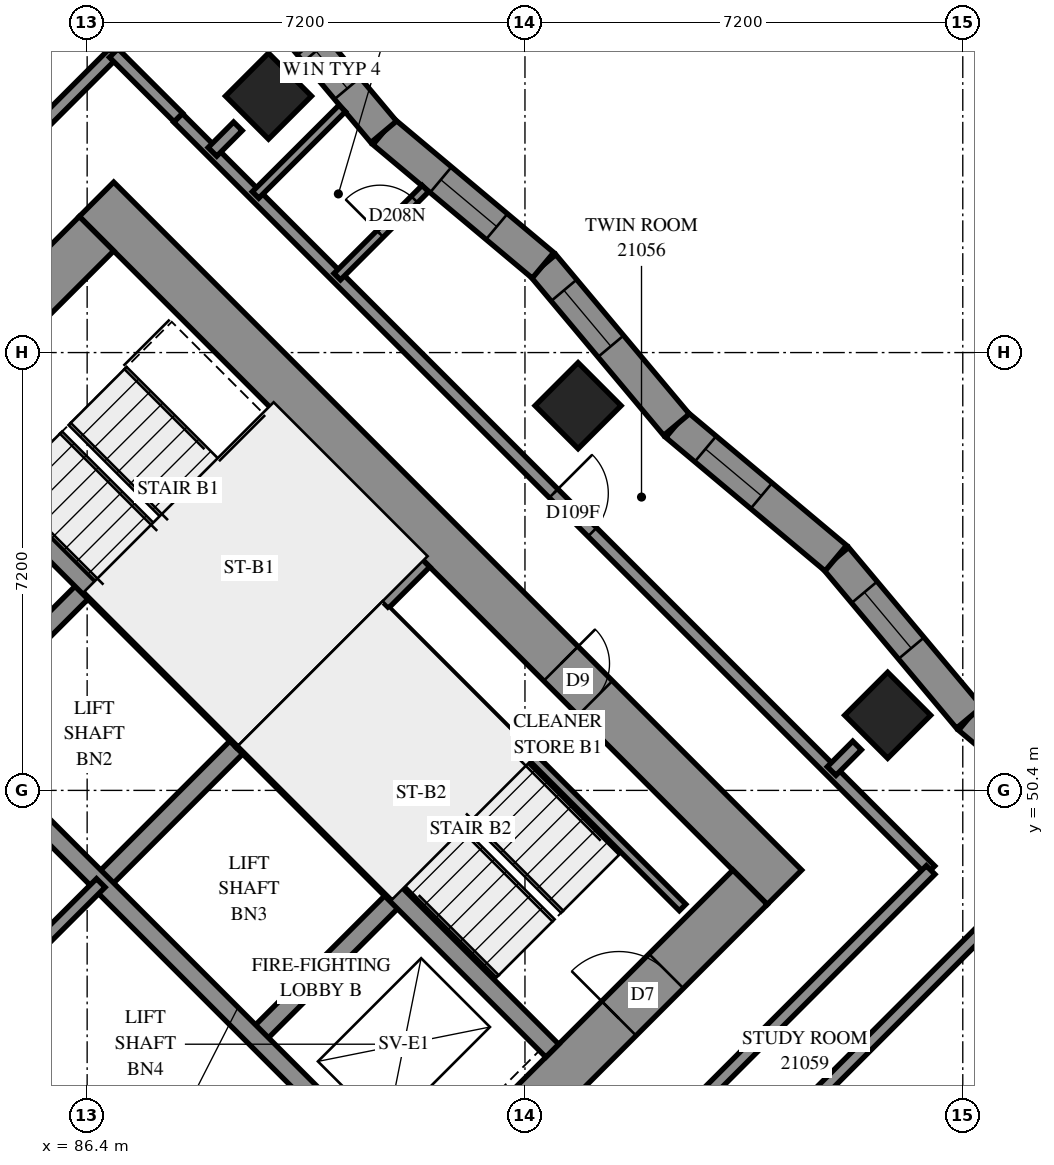
"""IFC4 building model, lengths in metres.
Left out: names, types, materials, properties, quantities, classifications, styles, units other than length and angle.
Written with IfcOpenShell. Run it as: python <this file> out.ifc"""

import sys

from ifc_helpers import new_model, si_unit, direction, frame, frame_2d, origin, origin_2d, place, context, subcontext, project, spatial, polyline, rectangle, outline, extrude, element, fill, save


model = new_model("IFC4")
c1 = context("Model", 3, precision=1e-05, world=origin(), true_north=direction((0.0, 1.0)))
c2 = subcontext(c1, "Body", "Model", "MODEL_VIEW")
j1 = project(units=[si_unit("LENGTHUNIT", "METRE"), si_unit("PLANEANGLEUNIT", "RADIAN")], contexts=[c1])
p1 = place(None, origin())
s1 = spatial("IfcSite", under=j1, at=p1, CompositionType="ELEMENT")
p2 = place(p1, origin())
s2 = spatial("IfcBuilding", under=s1, at=p2, CompositionType="ELEMENT")
p3 = place(p2, frame((0.0, 0.0, 81.2)))
s3 = spatial("IfcBuildingStorey", under=s2, at=p3, CompositionType="ELEMENT", Elevation=81.2)
for number, where, z_axis, x_axis in (
    (1, (89.382, 61.818, 0.0), (0.0, 0.0, 1.0), (0.707, -0.707, 0.0)),
    (2, (94.474, 56.727, 0.0), (0.0, 0.0, 1.0), (0.707, -0.707, 0.0)),
    (3, (99.565, 51.635, 0.0), (0.0, 0.0, 1.0), (0.707, -0.707, 0.0)),
):
    element("IfcColumn", number, at=place(p3, frame(where, z_axis=z_axis, x_axis=x_axis)), inside=s3, PredefinedType="COLUMN", context=c2, shape_type="SweptSolid", body=[
        extrude(rectangle(XDim=1.0, YDim=1.0, at=origin_2d()), origin(), (0.0, 0.0, 1.0), 3.1),
    ])
p4 = place(p3, frame((75.806, 49.373, -0.3), z_axis=(0.0, 0.0, 1.0), x_axis=(0.7071067812, -0.7071067812, 0.0)))
e4 = element("IfcWall", 4, at=p4, inside=s3, PredefinedType="SHEAR", context=c2, shape_type="SweptSolid", body=[
    extrude(rectangle(XDim=16.0, YDim=0.8, at=frame_2d((8.0, 0.0))), origin(), (0.0, 0.0, 1.0), 2.7),
])
p5 = place(p3, frame((86.554, 60.121, -0.3), z_axis=(0.0, 0.0, 1.0), x_axis=(0.7071067812, -0.7071067812, 0.0)))
e5 = element("IfcWall", 5, at=p5, inside=s3, PredefinedType="SHEAR", context=c2, shape_type="SweptSolid", body=[
    extrude(rectangle(XDim=16.0, YDim=0.8, at=frame_2d((8.0, 0.0))), origin(), (0.0, 0.0, 1.0), 2.7),
])
p6 = place(p5, frame((10.8, 0.0, 0.3)))
e6 = element("IfcOpeningElement", 6, at=p6, cuts=e5, PredefinedType="OPENING", context=c2, shape_type="SweptSolid", body=[
    extrude(rectangle(XDim=0.8, YDim=2.1, at=frame_2d((0.4, 1.05))), frame((0.0, 0.41, 0.0), z_axis=(0.0, -1.0, 0.0), x_axis=(1.0, 0.0, 0.0)), (0.0, 0.0, 1.0), 0.82),
])
p7 = place(p3, frame((76.372, 49.373, -0.3), z_axis=(0.0, 0.0, 1.0), x_axis=(0.7071067812, 0.7071067812, 0.0)))
e7 = element("IfcWall", 7, at=p7, inside=s3, PredefinedType="SHEAR", context=c2, shape_type="SweptSolid", body=[
    extrude(rectangle(XDim=14.4, YDim=0.8, at=frame_2d((7.2, 0.0))), origin(), (0.0, 0.0, 1.0), 2.7),
])
p8 = place(p7, frame((4.55, 0.0, 0.3)))
e8 = element("IfcOpeningElement", 8, at=p8, cuts=e7, PredefinedType="OPENING", context=c2, shape_type="SweptSolid", body=[
    extrude(rectangle(XDim=1.1, YDim=2.1, at=frame_2d((0.55, 1.05))), frame((0.0, 0.41, 0.0), z_axis=(0.0, -1.0, 0.0), x_axis=(1.0, 0.0, 0.0)), (0.0, 0.0, 1.0), 0.82),
])
p9 = place(p7, frame((11.35, 0.0, 0.3)))
e9 = element("IfcOpeningElement", 9, at=p9, cuts=e7, PredefinedType="OPENING", context=c2, shape_type="SweptSolid", body=[
    extrude(rectangle(XDim=1.1, YDim=2.1, at=frame_2d((0.55, 1.05))), frame((0.0, 0.41, 0.0), z_axis=(0.0, -1.0, 0.0), x_axis=(1.0, 0.0, 0.0)), (0.0, 0.0, 1.0), 0.82),
])
p10 = place(p3, frame((87.12, 38.625, -0.3), z_axis=(0.0, 0.0, 1.0), x_axis=(0.7071067812, 0.7071067812, 0.0)))
e10 = element("IfcWall", 10, at=p10, inside=s3, PredefinedType="SHEAR", context=c2, shape_type="SweptSolid", body=[
    extrude(rectangle(XDim=14.4, YDim=0.8, at=frame_2d((7.2, 0.0))), origin(), (0.0, 0.0, 1.0), 2.7),
])
p11 = place(p10, frame((4.55, 0.0, 0.3)))
e11 = element("IfcOpeningElement", 11, at=p11, cuts=e10, PredefinedType="OPENING", context=c2, shape_type="SweptSolid", body=[
    extrude(rectangle(XDim=1.1, YDim=2.1, at=frame_2d((0.55, 1.05))), frame((0.0, 0.41, 0.0), z_axis=(0.0, -1.0, 0.0), x_axis=(1.0, 0.0, 0.0)), (0.0, 0.0, 1.0), 0.82),
])
p12 = place(p10, frame((11.35, 0.0, 0.3)))
e12 = element("IfcOpeningElement", 12, at=p12, cuts=e10, PredefinedType="OPENING", context=c2, shape_type="SweptSolid", body=[
    extrude(rectangle(XDim=1.1, YDim=2.1, at=frame_2d((0.55, 1.05))), frame((0.0, 0.41, 0.0), z_axis=(0.0, -1.0, 0.0), x_axis=(1.0, 0.0, 0.0)), (0.0, 0.0, 1.0), 0.82),
])
p13 = place(p3, frame((84.079, 51.423, 0.0), z_axis=(0.0, 0.0, 1.0), x_axis=(0.7071219326, 0.7070916295, 0.0)))
e13 = element("IfcWall", 13, at=p13, inside=s3, PredefinedType="SOLIDWALL", context=c2, shape_type="SweptSolid", body=[
    extrude(rectangle(XDim=3.3, YDim=0.3, at=frame_2d((1.65, 0.0))), origin(), (0.0, 0.0, 1.0), 3.1),
])
for number, where, z_axis, x_axis in (
    (14, (86.625, 48.878, 0.0), (0.0, 0.0, 1.0), (0.707, 0.707, 0.0)),
    (15, (89.17, 46.332, 0.0), (0.0, 0.0, 1.0), (0.707, 0.707, 0.0)),
):
    element("IfcWall", number, at=place(p3, frame(where, z_axis=z_axis, x_axis=x_axis)), inside=s3, PredefinedType="SOLIDWALL", context=c2, shape_type="SweptSolid", body=[
        extrude(rectangle(XDim=3.3, YDim=0.3, at=frame_2d((1.65, 0.0))), origin(), (0.0, 0.0, 1.0), 3.1),
    ])
p14 = place(p3, frame((78.988, 51.423, 0.0), z_axis=(0.0, 0.0, 1.0), x_axis=(0.7071067812, -0.7071067812, 0.0)))
e16 = element("IfcWall", 16, at=p14, inside=s3, PredefinedType="SOLIDWALL", context=c2, shape_type="SweptSolid", body=[
    extrude(rectangle(XDim=14.4, YDim=0.3, at=frame_2d((7.2, 0.0))), origin(), (0.0, 0.0, 1.0), 3.1),
])
p15 = place(p14, frame((1.25, 0.0, 0.0)))
e17 = element("IfcOpeningElement", 17, at=p15, cuts=e16, PredefinedType="OPENING", context=c2, shape_type="SweptSolid", body=[
    extrude(rectangle(XDim=1.1, YDim=2.1, at=frame_2d((0.55, 1.05))), frame((0.0, 0.16, 0.0), z_axis=(0.0, -1.0, 0.0), x_axis=(1.0, 0.0, 0.0)), (0.0, 0.0, 1.0), 0.32),
])
p16 = place(p14, frame((4.85, 0.0, 0.0)))
e18 = element("IfcOpeningElement", 18, at=p16, cuts=e16, PredefinedType="OPENING", context=c2, shape_type="SweptSolid", body=[
    extrude(rectangle(XDim=1.1, YDim=2.1, at=frame_2d((0.55, 1.05))), frame((0.0, 0.16, 0.0), z_axis=(0.0, -1.0, 0.0), x_axis=(1.0, 0.0, 0.0)), (0.0, 0.0, 1.0), 0.32),
])
p17 = place(p14, frame((8.45, 0.0, 0.0)))
e19 = element("IfcOpeningElement", 19, at=p17, cuts=e16, PredefinedType="OPENING", context=c2, shape_type="SweptSolid", body=[
    extrude(rectangle(XDim=1.1, YDim=2.1, at=frame_2d((0.55, 1.05))), frame((0.0, 0.16, 0.0), z_axis=(0.0, -1.0, 0.0), x_axis=(1.0, 0.0, 0.0)), (0.0, 0.0, 1.0), 0.32),
])
p18 = place(p14, frame((12.05, 0.0, 0.0)))
e20 = element("IfcOpeningElement", 20, at=p18, cuts=e16, PredefinedType="OPENING", context=c2, shape_type="SweptSolid", body=[
    extrude(rectangle(XDim=1.1, YDim=2.1, at=frame_2d((0.55, 1.05))), frame((0.0, 0.16, 0.0), z_axis=(0.0, -1.0, 0.0), x_axis=(1.0, 0.0, 0.0)), (0.0, 0.0, 1.0), 0.32),
])
p19 = place(p3, frame((81.534, 53.969, 0.0), z_axis=(0.0, 0.0, 1.0), x_axis=(0.707103309, -0.7071102534, 0.0)))
e21 = element("IfcWall", 21, at=p19, inside=s3, PredefinedType="SOLIDWALL", context=c2, shape_type="SweptSolid", body=[
    extrude(rectangle(XDim=14.4, YDim=0.3, at=frame_2d((7.2, 0.0))), origin(), (0.0, 0.0, 1.0), 3.1),
])
p20 = place(p19, frame((12.05, 0.0, 0.0)))
e22 = element("IfcOpeningElement", 22, at=p20, cuts=e21, PredefinedType="OPENING", context=c2, shape_type="SweptSolid", body=[
    extrude(rectangle(XDim=1.1, YDim=2.1, at=frame_2d((0.55, 1.05))), frame((0.0, 0.16, 0.0), z_axis=(0.0, -1.0, 0.0), x_axis=(1.0, 0.0, 0.0)), (0.0, 0.0, 1.0), 0.32),
])
for number, where, z_axis, x_axis in (
    (23, (83.867, 56.302, 0.0), (0.0, 0.0, 1.0), (0.707, -0.707, 0.0)),
    (24, (88.958, 51.211, 0.0), (0.0, 0.0, 1.0), (0.707, -0.707, 0.0)),
):
    element("IfcWall", number, at=place(p3, frame(where, z_axis=z_axis, x_axis=x_axis)), inside=s3, PredefinedType="SOLIDWALL", context=c2, shape_type="SweptSolid", body=[
        extrude(rectangle(XDim=7.2, YDim=0.3, at=frame_2d((3.6, 0.0))), origin(), (0.0, 0.0, 1.0), 3.1),
    ])
p21 = place(p3, frame((88.958, 51.211, 0.0), z_axis=(0.0, 0.0, 1.0), x_axis=(0.7071067812, 0.7071067812, 0.0)))
e25 = element("IfcWall", 25, at=p21, inside=s3, PredefinedType="SOLIDWALL", context=c2, shape_type="SweptSolid", body=[
    extrude(rectangle(XDim=4.2, YDim=0.3, at=frame_2d((2.1, 0.0))), origin(), (0.0, 0.0, 1.0), 3.1),
])
p22 = place(p3, frame((103.527, 49.404, 0.0), z_axis=(0.0, 0.0, 1.0), x_axis=(-0.7664293929, 0.6423285652, 0.0)))
e26 = element("IfcWall", 26, at=p22, inside=s3, PredefinedType="SOLIDWALL", context=c2, shape_type="SweptSolid", body=[
    extrude(outline(polyline([(-0.024, -0.275), (3.394, -0.275), (3.442, 0.275), (0.024, 0.275), (-0.024, -0.275)])), origin(), (0.0, 0.0, 1.0), 3.1),
])
p23 = place(p22, frame((1.401, 0.0, 0.5)))
e27 = element("IfcOpeningElement", 27, at=p23, cuts=e26, PredefinedType="OPENING", context=c2, shape_type="SweptSolid", body=[
    extrude(rectangle(XDim=1.2, YDim=2.45, at=frame_2d((0.6, 1.225))), frame((0.0, 0.285, 0.0), z_axis=(0.0, -1.0, 0.0), x_axis=(1.0, 0.0, 0.0)), (0.0, 0.0, 1.0), 0.57),
])
p24 = place(p3, frame((100.907, 51.599, 0.0), z_axis=(0.0, 0.0, 1.0), x_axis=(-0.6423285652, 0.7664293929, 0.0)))
e28 = element("IfcWall", 28, at=p24, inside=s3, PredefinedType="SOLIDWALL", context=c2, shape_type="SweptSolid", body=[
    extrude(outline(polyline([(0.024, -0.275), (3.442, -0.275), (3.394, 0.275), (-0.024, 0.275), (0.024, -0.275)])), origin(), (0.0, 0.0, 1.0), 3.1),
])
p25 = place(p24, frame((1.486, 0.0, 0.5)))
e29 = element("IfcOpeningElement", 29, at=p25, cuts=e28, PredefinedType="OPENING", context=c2, shape_type="SweptSolid", body=[
    extrude(rectangle(XDim=1.2, YDim=2.45, at=frame_2d((0.6, 1.225))), frame((0.0, 0.285, 0.0), z_axis=(0.0, -1.0, 0.0), x_axis=(1.0, 0.0, 0.0)), (0.0, 0.0, 1.0), 0.57),
])
p26 = place(p3, frame((98.712, 54.219, 0.0), z_axis=(0.0, 0.0, 1.0), x_axis=(-0.7664437954, 0.6423113798, 0.0)))
e30 = element("IfcWall", 30, at=p26, inside=s3, PredefinedType="SOLIDWALL", context=c2, shape_type="SweptSolid", body=[
    extrude(outline(polyline([(-0.024, -0.275), (3.394, -0.275), (3.442, 0.275), (0.024, 0.275), (-0.024, -0.275)])), origin(), (0.0, 0.0, 1.0), 3.1),
])
p27 = place(p26, frame((1.596, 0.0, 0.5)))
e31 = element("IfcOpeningElement", 31, at=p27, cuts=e30, PredefinedType="OPENING", context=c2, shape_type="SweptSolid", body=[
    extrude(rectangle(XDim=1.2, YDim=2.45, at=frame_2d((0.6, 1.225))), frame((0.0, 0.285, 0.0), z_axis=(0.0, -1.0, 0.0), x_axis=(1.0, 0.0, 0.0)), (0.0, 0.0, 1.0), 0.57),
])
p28 = place(p3, frame((96.092, 56.414, 0.0), z_axis=(0.0, 0.0, 1.0), x_axis=(-0.6423141631, 0.7664414628, 0.0)))
e32 = element("IfcWall", 32, at=p28, inside=s3, PredefinedType="SOLIDWALL", context=c2, shape_type="SweptSolid", body=[
    extrude(outline(polyline([(0.024, -0.275), (3.442, -0.275), (3.394, 0.275), (-0.024, 0.275), (0.024, -0.275)])), origin(), (0.0, 0.0, 1.0), 3.1),
])
p29 = place(p28, frame((1.682, 0.0, 0.5)))
e33 = element("IfcOpeningElement", 33, at=p29, cuts=e32, PredefinedType="OPENING", context=c2, shape_type="SweptSolid", body=[
    extrude(rectangle(XDim=1.2, YDim=2.45, at=frame_2d((0.6, 1.225))), frame((0.0, 0.285, 0.0), z_axis=(0.0, -1.0, 0.0), x_axis=(1.0, 0.0, 0.0)), (0.0, 0.0, 1.0), 0.57),
])
p30 = place(p3, frame((93.897, 59.034, 0.0), z_axis=(0.0, 0.0, 1.0), x_axis=(-0.7664437954, 0.6423113798, 0.0)))
e34 = element("IfcWall", 34, at=p30, inside=s3, PredefinedType="SOLIDWALL", context=c2, shape_type="SweptSolid", body=[
    extrude(outline(polyline([(-0.024, -0.275), (3.394, -0.275), (3.442, 0.275), (0.024, 0.275), (-0.024, -0.275)])), origin(), (0.0, 0.0, 1.0), 3.1),
])
p31 = place(p30, frame((0.992, 0.0, 0.5)))
e35 = element("IfcOpeningElement", 35, at=p31, cuts=e34, PredefinedType="OPENING", context=c2, shape_type="SweptSolid", body=[
    extrude(rectangle(XDim=1.2, YDim=2.45, at=frame_2d((0.6, 1.225))), frame((0.0, 0.285, 0.0), z_axis=(0.0, -1.0, 0.0), x_axis=(1.0, 0.0, 0.0)), (0.0, 0.0, 1.0), 0.57),
])
p32 = place(p3, frame((91.277, 61.23, 0.0), z_axis=(0.0, 0.0, 1.0), x_axis=(-0.6422969775, 0.7664558648, 0.0)))
e36 = element("IfcWall", 36, at=p32, inside=s3, PredefinedType="SOLIDWALL", context=c2, shape_type="SweptSolid", body=[
    extrude(outline(polyline([(0.024, -0.275), (3.442, -0.275), (3.394, 0.275), (-0.024, 0.275), (0.024, -0.275)])), origin(), (0.0, 0.0, 1.0), 3.1),
])
p33 = place(p32, frame((1.878, 0.0, 0.5)))
e37 = element("IfcOpeningElement", 37, at=p33, cuts=e36, PredefinedType="OPENING", context=c2, shape_type="SweptSolid", body=[
    extrude(rectangle(XDim=1.2, YDim=2.45, at=frame_2d((0.6, 1.225))), frame((0.0, 0.285, 0.0), z_axis=(0.0, -1.0, 0.0), x_axis=(1.0, 0.0, 0.0)), (0.0, 0.0, 1.0), 0.57),
])
p34 = place(p32, frame((0.931, 0.0, 0.45)))
e38 = element("IfcOpeningElement", 38, at=p34, cuts=e36, PredefinedType="OPENING", context=c2, shape_type="SweptSolid", body=[
    extrude(rectangle(XDim=0.8, YDim=2.5, at=frame_2d((0.4, 1.25))), frame((0.0, 0.285, 0.0), z_axis=(0.0, -1.0, 0.0), x_axis=(1.0, 0.0, 0.0)), (0.0, 0.0, 1.0), 0.57),
])
p35 = place(p3, frame((91.313, 53.354, 0.0), z_axis=(0.0, 0.0, 1.0), x_axis=(0.7071140275, -0.7070995348, 0.0)))
e39 = element("IfcWall", 39, at=p35, inside=s3, PredefinedType="PARTITIONING", context=c2, shape_type="SweptSolid", body=[
    extrude(rectangle(XDim=6.9, YDim=0.15, at=frame_2d((3.45, 0.0))), origin(), (0.0, 0.0, 1.0), 3.1),
])
p36 = place(p3, frame((84.079, 46.332, 0.0), z_axis=(0.0, 0.0, 1.0), x_axis=(0.7071067812, 0.7071067812, 0.0)))
e40 = element("IfcWall", 40, at=p36, inside=s3, PredefinedType="PARTITIONING", context=c2, shape_type="SweptSolid", body=[
    extrude(rectangle(XDim=3.6, YDim=0.2, at=frame_2d((1.8, 0.0))), origin(), (0.0, 0.0, 1.0), 3.1),
])
p37 = place(p3, frame((87.894, 61.461, 0.0), z_axis=(0.0, 0.0, 1.0), x_axis=(0.7071067812, -0.7071067812, 0.0)))
e41 = element("IfcWall", 41, at=p37, inside=s3, PredefinedType="PARTITIONING", context=c2, shape_type="SweptSolid", body=[
    extrude(rectangle(XDim=17.5, YDim=0.2, at=frame_2d((8.75, 0.0))), origin(), (0.0, 0.0, 1.0), 3.1),
])
p38 = place(p37, frame((8.735, 0.0, 0.0)))
e42 = element("IfcOpeningElement", 42, at=p38, cuts=e41, PredefinedType="OPENING", context=c2, shape_type="SweptSolid", body=[
    extrude(rectangle(XDim=0.9, YDim=2.1, at=frame_2d((0.45, 1.05))), frame((0.0, 0.11, 0.0), z_axis=(0.0, -1.0, 0.0), x_axis=(1.0, 0.0, 0.0)), (0.0, 0.0, 1.0), 0.22),
])
p39 = place(p3, frame((95.215, 42.197, 0.0), z_axis=(0.0, 0.0, 1.0), x_axis=(0.7071114855, 0.7071020769, 0.0)))
e43 = element("IfcWall", 43, at=p39, inside=s3, PredefinedType="PARTITIONING", context=c2, shape_type="SweptSolid", body=[
    extrude(rectangle(XDim=10.629, YDim=0.2, at=frame_2d((5.314, 0.0))), origin(), (0.0, 0.0, 1.0), 3.1),
])
p40 = place(p3, frame((80.949, 58.477, 0.0), z_axis=(0.0, 0.0, 1.0), x_axis=(0.7071067812, 0.7071067812, 0.0)))
e44 = element("IfcWall", 44, at=p40, inside=s3, PredefinedType="PARTITIONING", context=c2, shape_type="SweptSolid", body=[
    extrude(rectangle(XDim=9.101, YDim=0.2, at=frame_2d((4.551, 0.0))), origin(), (0.0, 0.0, 1.0), 3.1),
])
p41 = place(p3, frame((94.297, 43.117, 0.0), z_axis=(0.0, 0.0, 1.0), x_axis=(0.7071067812, 0.7071067812, 0.0)))
e45 = element("IfcWall", 45, at=p41, inside=s3, PredefinedType="PARTITIONING", context=c2, shape_type="SweptSolid", body=[
    extrude(rectangle(XDim=8.448, YDim=0.2, at=frame_2d((4.224, 0.0))), origin(), (0.0, 0.0, 1.0), 3.1),
])
p42 = place(p41, frame((0.242, 0.0, 0.0)))
e46 = element("IfcOpeningElement", 46, at=p42, cuts=e45, PredefinedType="OPENING", context=c2, shape_type="SweptSolid", body=[
    extrude(rectangle(XDim=1.0, YDim=2.1, at=frame_2d((0.5, 1.05))), frame((0.0, 0.11, 0.0), z_axis=(0.0, -1.0, 0.0), x_axis=(1.0, 0.0, 0.0)), (0.0, 0.0, 1.0), 0.22),
])
p43 = place(p3, frame((80.951, 56.641, 0.0), z_axis=(0.0, 0.0, 1.0), x_axis=(0.7071067812, 0.7071067812, 0.0)))
e47 = element("IfcWall", 47, at=p43, inside=s3, PredefinedType="PARTITIONING", context=c2, shape_type="SweptSolid", body=[
    extrude(rectangle(XDim=8.321, YDim=0.2, at=frame_2d((4.161, 0.0))), origin(), (0.0, 0.0, 1.0), 3.1),
])
p44 = place(p43, frame((0.816, 0.0, 0.0)))
e48 = element("IfcOpeningElement", 48, at=p44, cuts=e47, PredefinedType="OPENING", context=c2, shape_type="SweptSolid", body=[
    extrude(rectangle(XDim=1.0, YDim=2.1, at=frame_2d((0.5, 1.05))), frame((0.0, 0.11, 0.0), z_axis=(0.0, -1.0, 0.0), x_axis=(1.0, 0.0, 0.0)), (0.0, 0.0, 1.0), 0.22),
])
p45 = place(p3, frame((90.513, 58.849, 0.0), z_axis=(0.0, 0.0, 1.0), x_axis=(0.7071311915, 0.70708237, 0.0)))
e49 = element("IfcWall", 49, at=p45, inside=s3, PredefinedType="PARTITIONING", context=c2, shape_type="SweptSolid", body=[
    extrude(rectangle(XDim=2.048, YDim=0.15, at=frame_2d((1.024, 0.0))), origin(), (0.0, 0.0, 1.0), 3.1),
])
p46 = place(p45, frame((0.996, 0.0, 0.0)))
e50 = element("IfcOpeningElement", 50, at=p46, cuts=e49, PredefinedType="OPENING", context=c2, shape_type="SweptSolid", body=[
    extrude(rectangle(XDim=0.8, YDim=2.1, at=frame_2d((0.4, 1.05))), frame((0.0, 0.085, 0.0), z_axis=(0.0, -1.0, 0.0), x_axis=(1.0, 0.0, 0.0)), (0.0, 0.0, 1.0), 0.17),
])
p47 = place(p3, frame((89.169, 60.193, 0.0), z_axis=(0.0, 0.0, 1.0), x_axis=(0.7076279259, 0.7065852521, 0.0)))
e51 = element("IfcWall", 51, at=p47, inside=s3, PredefinedType="PARTITIONING", context=c2, shape_type="SweptSolid", body=[
    extrude(rectangle(XDim=2.014, YDim=0.15, at=frame_2d((1.007, 0.0))), origin(), (0.0, 0.0, 1.0), 3.1),
])
p48 = place(p3, frame((86.838, 62.526, 0.0), z_axis=(0.0, 0.0, 1.0), x_axis=(0.70777292, -0.7064400143, 0.0)))
e52 = element("IfcWall", 52, at=p48, inside=s3, PredefinedType="PARTITIONING", context=c2, shape_type="SweptSolid", body=[
    extrude(rectangle(XDim=1.5, YDim=0.2, at=frame_2d((0.75, 0.0))), origin(), (0.0, 0.0, 1.0), 3.1),
])
for number, where, z_axis, x_axis in (
    (53, (88.461, 60.901, 0.0), (0.0, 0.0, 1.0), (0.705, 0.709, 0.0)),
    (54, (98.644, 50.718, 0.0), (0.0, 0.0, 1.0), (0.705, 0.709, 0.0)),
):
    element("IfcWall", number, at=place(p3, frame(where, z_axis=z_axis, x_axis=x_axis)), inside=s3, PredefinedType="PARTITIONING", context=c2, shape_type="SweptSolid", body=[
        extrude(rectangle(XDim=0.593, YDim=0.2, at=frame_2d((0.296, 0.0))), origin(), (0.0, 0.0, 1.0), 3.1),
    ])
p49 = place(p25, origin())
e55 = element("IfcWindow", 55, at=p49, inside=s3, PartitioningType="SINGLE_PANEL", PredefinedType="WINDOW", context=c2, shape_type="SweptSolid", body=[
    extrude(rectangle(XDim=1.2, YDim=2.45, at=frame_2d((0.6, 1.225))), frame((0.0, 0.155, 0.0), z_axis=(0.0, -1.0, 0.0), x_axis=(1.0, 0.0, 0.0)), (0.0, 0.0, 1.0), 0.06),
])
fill(e29, e55)
p50 = place(p27, origin())
e56 = element("IfcWindow", 56, at=p50, inside=s3, PartitioningType="SINGLE_PANEL", PredefinedType="WINDOW", context=c2, shape_type="SweptSolid", body=[
    extrude(rectangle(XDim=1.2, YDim=2.45, at=frame_2d((0.6, 1.225))), frame((0.0, 0.155, 0.0), z_axis=(0.0, -1.0, 0.0), x_axis=(1.0, 0.0, 0.0)), (0.0, 0.0, 1.0), 0.06),
])
fill(e31, e56)
p51 = place(p29, origin())
e57 = element("IfcWindow", 57, at=p51, inside=s3, PartitioningType="SINGLE_PANEL", PredefinedType="WINDOW", context=c2, shape_type="SweptSolid", body=[
    extrude(rectangle(XDim=1.2, YDim=2.45, at=frame_2d((0.6, 1.225))), frame((0.0, 0.155, 0.0), z_axis=(0.0, -1.0, 0.0), x_axis=(1.0, 0.0, 0.0)), (0.0, 0.0, 1.0), 0.06),
])
fill(e33, e57)
p52 = place(p31, origin())
e58 = element("IfcWindow", 58, at=p52, inside=s3, PartitioningType="SINGLE_PANEL", PredefinedType="WINDOW", context=c2, shape_type="SweptSolid", body=[
    extrude(rectangle(XDim=1.2, YDim=2.45, at=frame_2d((0.6, 1.225))), frame((0.0, 0.155, 0.0), z_axis=(0.0, -1.0, 0.0), x_axis=(1.0, 0.0, 0.0)), (0.0, 0.0, 1.0), 0.06),
])
fill(e35, e58)
p53 = place(p6, origin())
e59 = element("IfcDoor", 59, at=p53, inside=s3, OperationType="SINGLE_SWING_RIGHT", PredefinedType="DOOR", context=c2, shape_type="SweptSolid", body=[
    extrude(rectangle(XDim=0.8, YDim=2.1, at=frame_2d((0.4, 1.05))), frame((0.0, -0.34, 0.0), z_axis=(0.0, -1.0, 0.0), x_axis=(1.0, 0.0, 0.0)), (0.0, 0.0, 1.0), 0.05),
])
fill(e6, e59)
p54 = place(p12, origin())
e60 = element("IfcDoor", 60, at=p54, inside=s3, OperationType="SINGLE_SWING_RIGHT", PredefinedType="DOOR", context=c2, shape_type="SweptSolid", body=[
    extrude(rectangle(XDim=1.1, YDim=2.1, at=frame_2d((0.55, 1.05))), frame((0.0, 0.025, 0.0), z_axis=(0.0, -1.0, 0.0), x_axis=(1.0, 0.0, 0.0)), (0.0, 0.0, 1.0), 0.05),
])
fill(e12, e60)
p55 = place(p38, origin())
e61 = element("IfcDoor", 61, at=p55, inside=s3, OperationType="SINGLE_SWING_LEFT", PredefinedType="DOOR", context=c2, shape_type="SweptSolid", body=[
    extrude(rectangle(XDim=0.9, YDim=2.1, at=frame_2d((0.45, 1.05))), frame((0.0, 0.025, 0.0), z_axis=(0.0, -1.0, 0.0), x_axis=(1.0, 0.0, 0.0)), (0.0, 0.0, 1.0), 0.05),
])
fill(e42, e61)
p56 = place(p46, origin())
e62 = element("IfcDoor", 62, at=p56, inside=s3, OperationType="SINGLE_SWING_RIGHT", PredefinedType="DOOR", context=c2, shape_type="SweptSolid", body=[
    extrude(rectangle(XDim=0.8, YDim=2.1, at=frame_2d((0.4, 1.05))), frame((0.0, 0.025, 0.0), z_axis=(0.0, -1.0, 0.0), x_axis=(1.0, 0.0, 0.0)), (0.0, 0.0, 1.0), 0.05),
])
fill(e50, e62)
p57 = place(p34, origin())
e63 = element("IfcWindow", 63, at=p57, inside=s3, PartitioningType="SINGLE_PANEL", PredefinedType="WINDOW", context=c2, shape_type="SweptSolid", body=[
    extrude(rectangle(XDim=0.8, YDim=2.5, at=frame_2d((0.4, 1.25))), frame((0.0, 0.155, 0.0), z_axis=(0.0, -1.0, 0.0), x_axis=(1.0, 0.0, 0.0)), (0.0, 0.0, 1.0), 0.06),
])
fill(e38, e63)
save(model, sys.argv[1])
